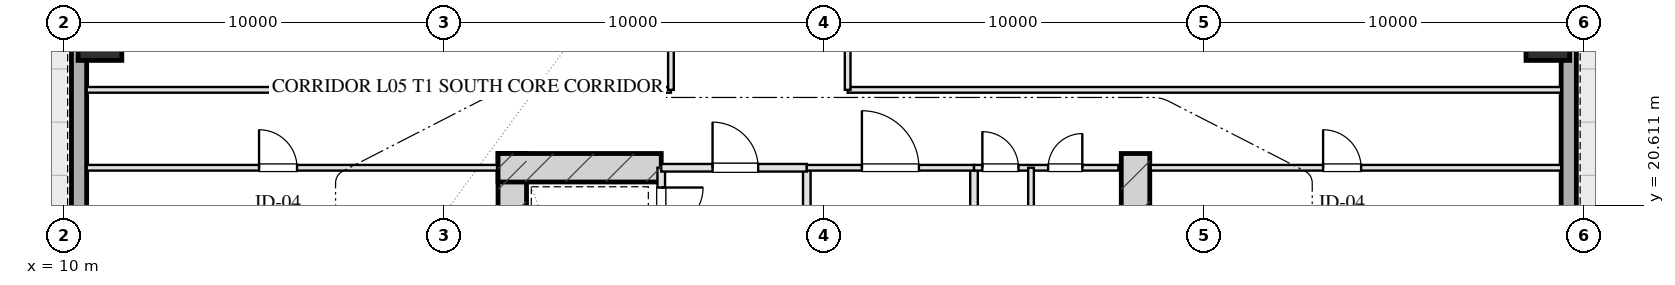
"""IFC4 building model, lengths in metres.
Left out: names, types, materials, properties, quantities, classifications, styles, units other than length and angle.
Written with IfcOpenShell. Run it as: python <this file> out.ifc"""

import sys

from ifc_helpers import new_model, si_unit, direction, frame, frame_2d, origin, origin_2d, place, context, subcontext, project, spatial, rectangle, hollow_rectangle, extrude, element, fill, save


model = new_model("IFC4")
c1 = context("Model", 3, precision=1e-05, world=origin(), true_north=direction((0.0, 1.0)))
c2 = subcontext(c1, "Body", "Model", "MODEL_VIEW")
j1 = project(units=[si_unit("LENGTHUNIT", "METRE"), si_unit("PLANEANGLEUNIT", "RADIAN")], contexts=[c1])
p1 = place(None, origin())
s1 = spatial("IfcSite", under=j1, at=p1, CompositionType="ELEMENT")
p2 = place(p1, origin())
s2 = spatial("IfcBuilding", under=s1, at=p2, CompositionType="ELEMENT")
p3 = place(p2, frame((0.0, 0.0, 26.0)))
s3 = spatial("IfcBuildingStorey", under=s2, at=p3, CompositionType="ELEMENT", Elevation=26.0)
for number, where, z_axis, x_axis in (
    (1, (21.8, 21.975, 0.0), (0.0, 0.0, 1.0), (0.0, -1.0, 0.0)),
    (2, (38.2, 21.975, 0.0), (0.0, 0.0, 1.0), (0.0, -1.0, 0.0)),
):
    element("IfcWall", number, at=place(p3, frame(where, z_axis=z_axis, x_axis=x_axis)), inside=s3, PredefinedType="SHEAR", context=c2, shape_type="SweptSolid", body=[
        extrude(rectangle(XDim=9.63, YDim=0.75, at=frame_2d((4.815, 0.0))), origin(), (0.0, 0.0, 1.0), 4.0),
    ])
p4 = place(p3, frame((21.425, 21.6, 0.0), z_axis=(0.0, 0.0, 1.0), x_axis=(1.0, 0.0, 0.0)))
e3 = element("IfcWall", 3, at=p4, inside=s3, PredefinedType="SHEAR", context=c2, shape_type="SweptSolid", body=[
    extrude(rectangle(XDim=4.295, YDim=0.75, at=frame_2d((2.147, 0.0))), origin(), (0.0, 0.0, 1.0), 4.0),
])
for number, where, z_axis, x_axis in (
    (4, (10.95, 25.0, 0.0), (0.0, 0.0, 1.0), (1.0, 0.0, 0.0)),
    (5, (49.05, 25.0, 0.0), (0.0, 0.0, 1.0), (1.0, 0.0, 0.0)),
):
    element("IfcColumn", number, at=place(p3, frame(where, z_axis=z_axis, x_axis=x_axis)), inside=s3, PredefinedType="COLUMN", context=c2, shape_type="SweptSolid", body=[
        extrude(hollow_rectangle(XDim=1.15, YDim=1.15, WallThickness=0.04, at=origin_2d()), origin(), (0.0, 0.0, 1.0), 4.001),
    ])
p5 = place(p3, frame((10.4, 7.2, 0.0), z_axis=(0.0, 0.0, 1.0), x_axis=(0.0, 1.0, 0.0)))
e6 = element("IfcWall", 6, at=p5, inside=s3, PredefinedType="SOLIDWALL", context=c2, shape_type="SweptSolid", body=[
    extrude(rectangle(XDim=53.6, YDim=0.4, at=frame_2d((26.8, 0.0))), origin(), (0.0, 0.0, 1.0), 3.16),
])
p6 = place(p5, frame((22.95, 0.0, 0.75)))
e7 = element("IfcOpeningElement", 7, at=p6, cuts=e6, PredefinedType="OPENING", context=c2, shape_type="SweptSolid", body=[
    extrude(rectangle(XDim=2.5, YDim=1.75, at=frame_2d((1.25, 0.875))), frame((0.0, 0.21, 0.0), z_axis=(0.0, -1.0, 0.0), x_axis=(1.0, 0.0, 0.0)), (0.0, 0.0, 1.0), 0.42),
])
p7 = place(p5, frame((28.15, 0.0, 0.75)))
e8 = element("IfcOpeningElement", 8, at=p7, cuts=e6, PredefinedType="OPENING", context=c2, shape_type="SweptSolid", body=[
    extrude(rectangle(XDim=2.5, YDim=1.75, at=frame_2d((1.25, 0.875))), frame((0.0, 0.21, 0.0), z_axis=(0.0, -1.0, 0.0), x_axis=(1.0, 0.0, 0.0)), (0.0, 0.0, 1.0), 0.42),
])
p8 = place(p3, frame((49.6, 60.8, 0.0), z_axis=(0.0, 0.0, 1.0), x_axis=(0.0, -1.0, 0.0)))
e9 = element("IfcWall", 9, at=p8, inside=s3, PredefinedType="SOLIDWALL", context=c2, shape_type="SweptSolid", body=[
    extrude(rectangle(XDim=53.6, YDim=0.4, at=frame_2d((26.8, 0.0))), origin(), (0.0, 0.0, 1.0), 3.16),
])
p9 = place(p8, frame((28.15, 0.0, 0.75)))
e10 = element("IfcOpeningElement", 10, at=p9, cuts=e9, PredefinedType="OPENING", context=c2, shape_type="SweptSolid", body=[
    extrude(rectangle(XDim=2.5, YDim=1.75, at=frame_2d((1.25, 0.875))), frame((0.0, 0.21, 0.0), z_axis=(0.0, -1.0, 0.0), x_axis=(1.0, 0.0, 0.0)), (0.0, 0.0, 1.0), 0.42),
])
p10 = place(p8, frame((22.95, 0.0, 0.75)))
e11 = element("IfcOpeningElement", 11, at=p10, cuts=e9, PredefinedType="OPENING", context=c2, shape_type="SweptSolid", body=[
    extrude(rectangle(XDim=2.5, YDim=1.75, at=frame_2d((1.25, 0.875))), frame((0.0, 0.21, 0.0), z_axis=(0.0, -1.0, 0.0), x_axis=(1.0, 0.0, 0.0)), (0.0, 0.0, 1.0), 0.42),
])
p11 = place(p3, frame((25.72, 21.6, 0.0), z_axis=(0.0, 0.0, 1.0), x_axis=(0.0, -1.0, 0.0)))
e12 = element("IfcWall", 12, at=p11, inside=s3, PredefinedType="PARTITIONING", context=c2, shape_type="SweptSolid", body=[
    extrude(rectangle(XDim=1.9, YDim=0.2, at=frame_2d((0.95, 0.0))), origin(), (0.0, 0.0, 1.0), 3.725),
])
p12 = place(p11, frame((0.52, 0.0, 0.0)))
e13 = element("IfcOpeningElement", 13, at=p12, cuts=e12, PredefinedType="OPENING", context=c2, shape_type="SweptSolid", body=[
    extrude(rectangle(XDim=1.1, YDim=2.05, at=frame_2d((0.55, 1.025))), frame((0.0, 0.11, 0.0), z_axis=(0.0, -1.0, 0.0), x_axis=(1.0, 0.0, 0.0)), (0.0, 0.0, 1.0), 0.22),
])
p13 = place(p3, frame((29.55, 21.6, 0.0), z_axis=(0.0, 0.0, 1.0), x_axis=(0.0, -1.0, 0.0)))
e14 = element("IfcWall", 14, at=p13, inside=s3, PredefinedType="PARTITIONING", context=c2, shape_type="SweptSolid", body=[
    extrude(rectangle(XDim=8.43, YDim=0.2, at=frame_2d((4.215, 0.0))), origin(), (0.0, 0.0, 1.0), 3.725),
])
p14 = place(p3, frame((25.72, 21.6, 0.0), z_axis=(0.0, 0.0, 1.0), x_axis=(1.0, 0.0, 0.0)))
e15 = element("IfcWall", 15, at=p14, inside=s3, PredefinedType="PARTITIONING", context=c2, shape_type="SweptSolid", body=[
    extrude(rectangle(XDim=3.83, YDim=0.2, at=frame_2d((1.915, 0.0))), origin(), (0.0, 0.0, 1.0), 3.725),
])
p15 = place(p14, frame((1.35, 0.0, 0.0)))
e16 = element("IfcOpeningElement", 16, at=p15, cuts=e15, PredefinedType="OPENING", context=c2, shape_type="SweptSolid", body=[
    extrude(rectangle(XDim=1.2, YDim=2.05, at=frame_2d((0.6, 1.025))), frame((0.0, 0.11, 0.0), z_axis=(0.0, -1.0, 0.0), x_axis=(1.0, 0.0, 0.0)), (0.0, 0.0, 1.0), 0.22),
])
p16 = place(p3, frame((33.95, 21.6, 0.0), z_axis=(0.0, 0.0, 1.0), x_axis=(0.0, -1.0, 0.0)))
e17 = element("IfcWall", 17, at=p16, inside=s3, PredefinedType="PARTITIONING", context=c2, shape_type="SweptSolid", body=[
    extrude(rectangle(XDim=8.43, YDim=0.2, at=frame_2d((4.215, 0.0))), origin(), (0.0, 0.0, 1.0), 3.725),
])
p17 = place(p3, frame((29.55, 21.6, 0.0), z_axis=(0.0, 0.0, 1.0), x_axis=(1.0, 0.0, 0.0)))
e18 = element("IfcWall", 18, at=p17, inside=s3, PredefinedType="PARTITIONING", context=c2, shape_type="SweptSolid", body=[
    extrude(rectangle(XDim=4.4, YDim=0.15, at=frame_2d((2.2, 0.0))), origin(), (0.0, 0.0, 1.0), 3.725),
])
p18 = place(p17, frame((1.45, 0.0, 0.0)))
e19 = element("IfcOpeningElement", 19, at=p18, cuts=e18, PredefinedType="OPENING", context=c2, shape_type="SweptSolid", body=[
    extrude(rectangle(XDim=1.5, YDim=2.05, at=frame_2d((0.75, 1.025))), frame((0.0, 0.085, 0.0), z_axis=(0.0, -1.0, 0.0), x_axis=(1.0, 0.0, 0.0)), (0.0, 0.0, 1.0), 0.17),
])
p19 = place(p3, frame((33.95, 21.6, 0.0), z_axis=(0.0, 0.0, 1.0), x_axis=(1.0, 0.0, 0.0)))
e20 = element("IfcWall", 20, at=p19, inside=s3, PredefinedType="PARTITIONING", context=c2, shape_type="SweptSolid", body=[
    extrude(rectangle(XDim=3.8, YDim=0.15, at=frame_2d((1.9, 0.0))), origin(), (0.0, 0.0, 1.0), 3.725),
])
p20 = place(p19, frame((0.22, 0.0, 0.0)))
e21 = element("IfcOpeningElement", 21, at=p20, cuts=e20, PredefinedType="OPENING", context=c2, shape_type="SweptSolid", body=[
    extrude(rectangle(XDim=0.95, YDim=2.05, at=frame_2d((0.475, 1.025))), frame((0.0, 0.085, 0.0), z_axis=(0.0, -1.0, 0.0), x_axis=(1.0, 0.0, 0.0)), (0.0, 0.0, 1.0), 0.17),
])
p21 = place(p19, frame((1.95, 0.0, 0.0)))
e22 = element("IfcOpeningElement", 22, at=p21, cuts=e20, PredefinedType="OPENING", context=c2, shape_type="SweptSolid", body=[
    extrude(rectangle(XDim=0.9, YDim=2.05, at=frame_2d((0.45, 1.025))), frame((0.0, 0.085, 0.0), z_axis=(0.0, -1.0, 0.0), x_axis=(1.0, 0.0, 0.0)), (0.0, 0.0, 1.0), 0.17),
])
p22 = place(p3, frame((35.45, 21.6, 0.0), z_axis=(0.0, 0.0, 1.0), x_axis=(0.0, -1.0, 0.0)))
e23 = element("IfcWall", 23, at=p22, inside=s3, PredefinedType="PARTITIONING", context=c2, shape_type="SweptSolid", body=[
    extrude(rectangle(XDim=8.43, YDim=0.15, at=frame_2d((4.215, 0.0))), origin(), (0.0, 0.0, 1.0), 3.365),
])
p23 = place(p22, frame((2.55, 0.0, 0.0)))
e24 = element("IfcOpeningElement", 24, at=p23, cuts=e23, PredefinedType="OPENING", context=c2, shape_type="SweptSolid", body=[
    extrude(rectangle(XDim=0.95, YDim=2.05, at=frame_2d((0.475, 1.025))), frame((0.0, 0.085, 0.0), z_axis=(0.0, -1.0, 0.0), x_axis=(1.0, 0.0, 0.0)), (0.0, 0.0, 1.0), 0.17),
])
p24 = place(p22, frame((5.6, 0.0, 0.0)))
e25 = element("IfcOpeningElement", 25, at=p24, cuts=e23, PredefinedType="OPENING", context=c2, shape_type="SweptSolid", body=[
    extrude(rectangle(XDim=0.9, YDim=2.05, at=frame_2d((0.45, 1.025))), frame((0.0, 0.085, 0.0), z_axis=(0.0, -1.0, 0.0), x_axis=(1.0, 0.0, 0.0)), (0.0, 0.0, 1.0), 0.17),
])
p25 = place(p3, frame((10.6, 21.6, 0.0), z_axis=(0.0, 0.0, 1.0), x_axis=(1.0, 0.0, 0.0)))
e26 = element("IfcWall", 26, at=p25, inside=s3, PredefinedType="PARTITIONING", context=c2, shape_type="SweptSolid", body=[
    extrude(rectangle(XDim=10.8, YDim=0.15, at=frame_2d((5.4, 0.0))), origin(), (0.0, 0.0, 1.0), 3.725),
])
p26 = place(p25, frame((4.536, 0.0, 0.0)))
e27 = element("IfcOpeningElement", 27, at=p26, cuts=e26, PredefinedType="OPENING", context=c2, shape_type="SweptSolid", body=[
    extrude(rectangle(XDim=1.0, YDim=2.05, at=frame_2d((0.5, 1.025))), frame((0.0, 0.085, 0.0), z_axis=(0.0, -1.0, 0.0), x_axis=(1.0, 0.0, 0.0)), (0.0, 0.0, 1.0), 0.17),
])
p27 = place(p3, frame((38.6, 21.6, 0.0), z_axis=(0.0, 0.0, 1.0), x_axis=(1.0, 0.0, 0.0)))
e28 = element("IfcWall", 28, at=p27, inside=s3, PredefinedType="PARTITIONING", context=c2, shape_type="SweptSolid", body=[
    extrude(rectangle(XDim=10.8, YDim=0.15, at=frame_2d((5.4, 0.0))), origin(), (0.0, 0.0, 1.0), 3.725),
])
p28 = place(p27, frame((4.536, 0.0, 0.0)))
e29 = element("IfcOpeningElement", 29, at=p28, cuts=e28, PredefinedType="OPENING", context=c2, shape_type="SweptSolid", body=[
    extrude(rectangle(XDim=1.0, YDim=2.05, at=frame_2d((0.5, 1.025))), frame((0.0, 0.085, 0.0), z_axis=(0.0, -1.0, 0.0), x_axis=(1.0, 0.0, 0.0)), (0.0, 0.0, 1.0), 0.17),
])
p29 = place(p3, frame((10.6, 23.65, 0.0), z_axis=(0.0, 0.0, 1.0), x_axis=(1.0, 0.0, 0.0)))
e30 = element("IfcWall", 30, at=p29, inside=s3, PredefinedType="PARTITIONING", context=c2, shape_type="SweptSolid", body=[
    extrude(rectangle(XDim=15.375, YDim=0.15, at=frame_2d((7.688, 0.0))), origin(), (0.0, 0.0, 1.0), 3.725),
])
p30 = place(p3, frame((30.625, 23.65, 0.0), z_axis=(0.0, 0.0, 1.0), x_axis=(1.0, 0.0, 0.0)))
e31 = element("IfcWall", 31, at=p30, inside=s3, PredefinedType="PARTITIONING", context=c2, shape_type="SweptSolid", body=[
    extrude(rectangle(XDim=18.775, YDim=0.15, at=frame_2d((9.387, 0.0))), origin(), (0.0, 0.0, 1.0), 3.725),
])
p31 = place(p3, frame((25.975, 23.65, 0.0), z_axis=(0.0, 0.0, 1.0), x_axis=(0.0, 1.0, 0.0)))
e32 = element("IfcWall", 32, at=p31, inside=s3, PredefinedType="PARTITIONING", context=c2, shape_type="SweptSolid", body=[
    extrude(rectangle(XDim=20.7, YDim=0.15, at=frame_2d((10.35, 0.0))), origin(), (0.0, 0.0, 1.0), 3.725),
])
p32 = place(p31, frame((2.175, 0.0, 0.0)))
e33 = element("IfcOpeningElement", 33, at=p32, cuts=e32, PredefinedType="OPENING", context=c2, shape_type="SweptSolid", body=[
    extrude(rectangle(XDim=1.0, YDim=2.05, at=frame_2d((0.5, 1.025))), frame((0.0, 0.085, 0.0), z_axis=(0.0, -1.0, 0.0), x_axis=(1.0, 0.0, 0.0)), (0.0, 0.0, 1.0), 0.17),
])
p33 = place(p31, frame((7.69, 0.0, 0.0)))
e34 = element("IfcOpeningElement", 34, at=p33, cuts=e32, PredefinedType="OPENING", context=c2, shape_type="SweptSolid", body=[
    extrude(rectangle(XDim=1.0, YDim=2.05, at=frame_2d((0.5, 1.025))), frame((0.0, 0.085, 0.0), z_axis=(0.0, -1.0, 0.0), x_axis=(1.0, 0.0, 0.0)), (0.0, 0.0, 1.0), 0.17),
])
p34 = place(p31, frame((12.69, 0.0, 0.0)))
e35 = element("IfcOpeningElement", 35, at=p34, cuts=e32, PredefinedType="OPENING", context=c2, shape_type="SweptSolid", body=[
    extrude(rectangle(XDim=1.0, YDim=2.05, at=frame_2d((0.5, 1.025))), frame((0.0, 0.085, 0.0), z_axis=(0.0, -1.0, 0.0), x_axis=(1.0, 0.0, 0.0)), (0.0, 0.0, 1.0), 0.17),
])
p35 = place(p31, frame((17.525, 0.0, 0.0)))
e36 = element("IfcOpeningElement", 36, at=p35, cuts=e32, PredefinedType="OPENING", context=c2, shape_type="SweptSolid", body=[
    extrude(rectangle(XDim=1.0, YDim=2.05, at=frame_2d((0.5, 1.025))), frame((0.0, 0.085, 0.0), z_axis=(0.0, -1.0, 0.0), x_axis=(1.0, 0.0, 0.0)), (0.0, 0.0, 1.0), 0.17),
])
p36 = place(p3, frame((30.625, 23.65, 0.0), z_axis=(0.0, 0.0, 1.0), x_axis=(0.0, 1.0, 0.0)))
e37 = element("IfcWall", 37, at=p36, inside=s3, PredefinedType="PARTITIONING", context=c2, shape_type="SweptSolid", body=[
    extrude(rectangle(XDim=20.7, YDim=0.15, at=frame_2d((10.35, 0.0))), origin(), (0.0, 0.0, 1.0), 3.725),
])
p37 = place(p36, frame((2.191, 0.0, 0.0)))
e38 = element("IfcOpeningElement", 38, at=p37, cuts=e37, PredefinedType="OPENING", context=c2, shape_type="SweptSolid", body=[
    extrude(rectangle(XDim=1.0, YDim=2.05, at=frame_2d((0.5, 1.025))), frame((0.0, 0.085, 0.0), z_axis=(0.0, -1.0, 0.0), x_axis=(1.0, 0.0, 0.0)), (0.0, 0.0, 1.0), 0.17),
])
p38 = place(p36, frame((7.78, 0.0, 0.0)))
e39 = element("IfcOpeningElement", 39, at=p38, cuts=e37, PredefinedType="OPENING", context=c2, shape_type="SweptSolid", body=[
    extrude(rectangle(XDim=1.0, YDim=2.05, at=frame_2d((0.5, 1.025))), frame((0.0, 0.085, 0.0), z_axis=(0.0, -1.0, 0.0), x_axis=(1.0, 0.0, 0.0)), (0.0, 0.0, 1.0), 0.17),
])
p39 = place(p36, frame((12.764, 0.0, 0.0)))
e40 = element("IfcOpeningElement", 40, at=p39, cuts=e37, PredefinedType="OPENING", context=c2, shape_type="SweptSolid", body=[
    extrude(rectangle(XDim=1.05, YDim=2.05, at=frame_2d((0.525, 1.025))), frame((0.0, 0.085, 0.0), z_axis=(0.0, -1.0, 0.0), x_axis=(1.0, 0.0, 0.0)), (0.0, 0.0, 1.0), 0.17),
])
p40 = place(p36, frame((17.525, 0.0, 0.0)))
e41 = element("IfcOpeningElement", 41, at=p40, cuts=e37, PredefinedType="OPENING", context=c2, shape_type="SweptSolid", body=[
    extrude(rectangle(XDim=1.0, YDim=2.05, at=frame_2d((0.5, 1.025))), frame((0.0, 0.085, 0.0), z_axis=(0.0, -1.0, 0.0), x_axis=(1.0, 0.0, 0.0)), (0.0, 0.0, 1.0), 0.17),
])
p41 = place(p12, origin())
e42 = element("IfcDoor", 42, at=p41, inside=s3, OperationType="SINGLE_SWING_LEFT", PredefinedType="DOOR", context=c2, shape_type="SweptSolid", body=[
    extrude(rectangle(XDim=1.1, YDim=2.05, at=frame_2d((0.55, 1.025))), frame((0.0, 0.025, 0.0), z_axis=(0.0, -1.0, 0.0), x_axis=(1.0, 0.0, 0.0)), (0.0, 0.0, 1.0), 0.05),
])
fill(e13, e42)
p42 = place(p15, origin())
e43 = element("IfcDoor", 43, at=p42, inside=s3, OperationType="SINGLE_SWING_LEFT", PredefinedType="DOOR", context=c2, shape_type="SweptSolid", body=[
    extrude(rectangle(XDim=1.2, YDim=2.05, at=frame_2d((0.6, 1.025))), frame((0.0, 0.025, 0.0), z_axis=(0.0, -1.0, 0.0), x_axis=(1.0, 0.0, 0.0)), (0.0, 0.0, 1.0), 0.05),
])
fill(e16, e43)
p43 = place(p18, origin())
e44 = element("IfcDoor", 44, at=p43, inside=s3, OperationType="SINGLE_SWING_LEFT", PredefinedType="DOOR", context=c2, shape_type="SweptSolid", body=[
    extrude(rectangle(XDim=1.5, YDim=2.05, at=frame_2d((0.75, 1.025))), frame((0.0, 0.025, 0.0), z_axis=(0.0, -1.0, 0.0), x_axis=(1.0, 0.0, 0.0)), (0.0, 0.0, 1.0), 0.05),
])
fill(e19, e44)
p44 = place(p20, origin())
e45 = element("IfcDoor", 45, at=p44, inside=s3, OperationType="SINGLE_SWING_LEFT", PredefinedType="DOOR", context=c2, shape_type="SweptSolid", body=[
    extrude(rectangle(XDim=0.95, YDim=2.05, at=frame_2d((0.475, 1.025))), frame((0.0, 0.025, 0.0), z_axis=(0.0, -1.0, 0.0), x_axis=(1.0, 0.0, 0.0)), (0.0, 0.0, 1.0), 0.05),
])
fill(e21, e45)
p45 = place(p21, origin())
e46 = element("IfcDoor", 46, at=p45, inside=s3, OperationType="SINGLE_SWING_RIGHT", PredefinedType="DOOR", context=c2, shape_type="SweptSolid", body=[
    extrude(rectangle(XDim=0.9, YDim=2.05, at=frame_2d((0.45, 1.025))), frame((0.0, 0.025, 0.0), z_axis=(0.0, -1.0, 0.0), x_axis=(1.0, 0.0, 0.0)), (0.0, 0.0, 1.0), 0.05),
])
fill(e22, e46)
p46 = place(p26, origin())
e47 = element("IfcDoor", 47, at=p46, inside=s3, OperationType="SINGLE_SWING_LEFT", PredefinedType="DOOR", context=c2, shape_type="SweptSolid", body=[
    extrude(rectangle(XDim=1.0, YDim=2.05, at=frame_2d((0.5, 1.025))), frame((0.0, 0.025, 0.0), z_axis=(0.0, -1.0, 0.0), x_axis=(1.0, 0.0, 0.0)), (0.0, 0.0, 1.0), 0.05),
])
fill(e27, e47)
p47 = place(p28, origin())
e48 = element("IfcDoor", 48, at=p47, inside=s3, OperationType="SINGLE_SWING_LEFT", PredefinedType="DOOR", context=c2, shape_type="SweptSolid", body=[
    extrude(rectangle(XDim=1.0, YDim=2.05, at=frame_2d((0.5, 1.025))), frame((0.0, 0.025, 0.0), z_axis=(0.0, -1.0, 0.0), x_axis=(1.0, 0.0, 0.0)), (0.0, 0.0, 1.0), 0.05),
])
fill(e29, e48)
save(model, sys.argv[1])
